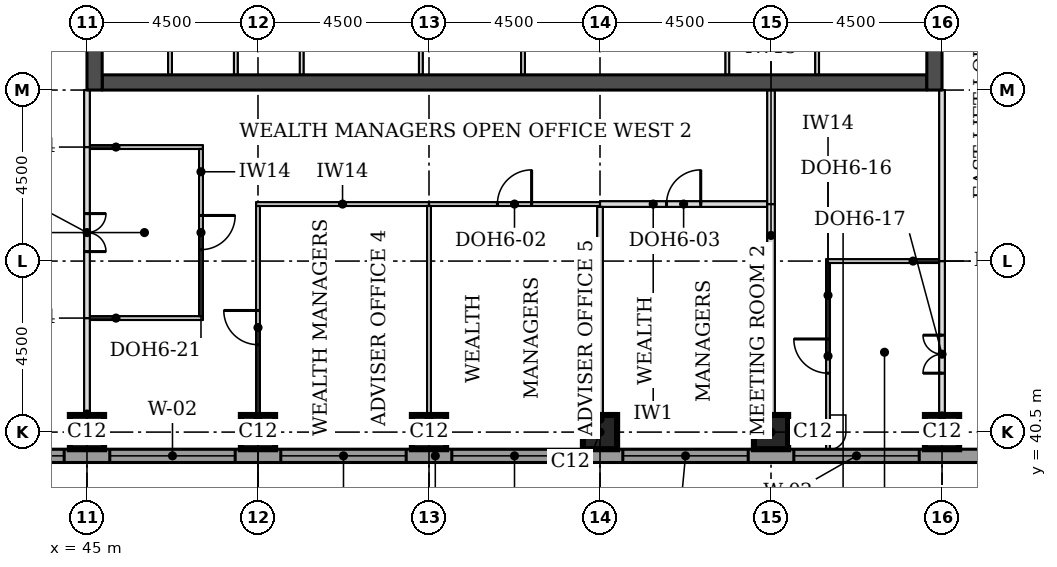
"""IFC4 building model, lengths in metres.
Left out: names, types, materials, properties, quantities, classifications, styles, units other than length and angle.
Written with IfcOpenShell. Run it as: python <this file> out.ifc"""

import sys

from ifc_helpers import new_model, si_unit, direction, frame, frame_2d, origin, origin_2d, place, context, subcontext, project, spatial, rectangle, extrude, element, fill, save


model = new_model("IFC4")
c1 = context("Model", 3, precision=1e-05, world=origin(), true_north=direction((0.0, 1.0)))
c2 = subcontext(c1, "Body", "Model", "MODEL_VIEW")
j1 = project(units=[si_unit("LENGTHUNIT", "METRE"), si_unit("PLANEANGLEUNIT", "RADIAN")], contexts=[c1])
p1 = place(None, origin())
s1 = spatial("IfcSite", under=j1, at=p1, CompositionType="ELEMENT")
p2 = place(p1, origin())
s2 = spatial("IfcBuilding", under=s1, at=p2, CompositionType="ELEMENT")
p3 = place(p2, frame((0.0, 0.0, 188.4)))
s3 = spatial("IfcBuildingStorey", under=s2, at=p3, CompositionType="ELEMENT", Elevation=188.4)
for number, where, z_axis, x_axis in (
    (1, (45.0, 40.5, 0.0), (0.0, 0.0, 1.0), (1.0, 0.0, 0.0)),
    (2, (49.5, 40.5, 0.0), (0.0, 0.0, 1.0), (1.0, 0.0, 0.0)),
    (3, (54.0, 40.5, 0.0), (0.0, 0.0, 1.0), (1.0, 0.0, 0.0)),
    (4, (58.5, 40.5, 0.0), (0.0, 0.0, 1.0), (1.0, 0.0, 0.0)),
    (5, (63.0, 40.5, 0.0), (0.0, 0.0, 1.0), (1.0, 0.0, 0.0)),
    (6, (67.5, 40.5, 0.0), (0.0, 0.0, 1.0), (1.0, 0.0, 0.0)),
):
    element("IfcColumn", number, at=place(p3, frame(where, z_axis=z_axis, x_axis=x_axis)), inside=s3, PredefinedType="COLUMN", context=c2, shape_type="SweptSolid", body=[
        extrude(rectangle(XDim=0.9, YDim=0.9, at=origin_2d()), origin(), (0.0, 0.0, 1.0), 3.7),
    ])
p4 = place(p3, frame((45.4, 49.7, 0.0), z_axis=(0.0, 0.0, 1.0), x_axis=(1.0, 0.0, 0.0)))
e7 = element("IfcWall", 7, at=p4, inside=s3, PredefinedType="SHEAR", context=c2, shape_type="SweptSolid", body=[
    extrude(rectangle(XDim=21.7, YDim=0.4, at=frame_2d((10.85, 0.0))), origin(), (0.0, 0.0, 1.0), 3.7),
])
p5 = place(p3, frame((45.2, 49.5, 0.0), z_axis=(0.0, 0.0, 1.0), x_axis=(0.0, 1.0, 0.0)))
e8 = element("IfcWall", 8, at=p5, inside=s3, PredefinedType="SHEAR", context=c2, shape_type="SweptSolid", body=[
    extrude(rectangle(XDim=22.5, YDim=0.4, at=frame_2d((11.25, 0.0))), origin(), (0.0, 0.0, 1.0), 3.7),
])
p6 = place(p5, frame((4.2, 0.0, 0.0)))
e9 = element("IfcOpeningElement", 9, at=p6, cuts=e8, PredefinedType="OPENING", context=c2, shape_type="SweptSolid", body=[
    extrude(rectangle(XDim=1.8, YDim=2.1, at=frame_2d((0.9, 1.05))), frame((0.0, 0.21, 0.0), z_axis=(0.0, -1.0, 0.0), x_axis=(1.0, 0.0, 0.0)), (0.0, 0.0, 1.0), 0.42),
])
p7 = place(p5, frame((6.9, 0.0, 0.0)))
e10 = element("IfcOpeningElement", 10, at=p7, cuts=e8, PredefinedType="OPENING", context=c2, shape_type="SweptSolid", body=[
    extrude(rectangle(XDim=1.1, YDim=2.1, at=frame_2d((0.55, 1.05))), frame((0.0, 0.21, 0.0), z_axis=(0.0, -1.0, 0.0), x_axis=(1.0, 0.0, 0.0)), (0.0, 0.0, 1.0), 0.42),
])
p8 = place(p5, frame((13.6, 0.0, 0.0)))
e11 = element("IfcOpeningElement", 11, at=p8, cuts=e8, PredefinedType="OPENING", context=c2, shape_type="SweptSolid", body=[
    extrude(rectangle(XDim=1.1, YDim=2.1, at=frame_2d((0.55, 1.05))), frame((0.0, 0.21, 0.0), z_axis=(0.0, -1.0, 0.0), x_axis=(1.0, 0.0, 0.0)), (0.0, 0.0, 1.0), 0.42),
])
p9 = place(p5, frame((16.5, 0.0, 0.0)))
e12 = element("IfcOpeningElement", 12, at=p9, cuts=e8, PredefinedType="OPENING", context=c2, shape_type="SweptSolid", body=[
    extrude(rectangle(XDim=1.8, YDim=2.1, at=frame_2d((0.9, 1.05))), frame((0.0, 0.21, 0.0), z_axis=(0.0, -1.0, 0.0), x_axis=(1.0, 0.0, 0.0)), (0.0, 0.0, 1.0), 0.42),
])
p10 = place(p3, frame((67.3, 49.5, 0.0), z_axis=(0.0, 0.0, 1.0), x_axis=(0.0, 1.0, 0.0)))
e13 = element("IfcWall", 13, at=p10, inside=s3, PredefinedType="SHEAR", context=c2, shape_type="SweptSolid", body=[
    extrude(rectangle(XDim=22.5, YDim=0.4, at=frame_2d((11.25, 0.0))), origin(), (0.0, 0.0, 1.0), 3.7),
])
p11 = place(p10, frame((4.2, 0.0, 0.0)))
e14 = element("IfcOpeningElement", 14, at=p11, cuts=e13, PredefinedType="OPENING", context=c2, shape_type="SweptSolid", body=[
    extrude(rectangle(XDim=1.8, YDim=2.1, at=frame_2d((0.9, 1.05))), frame((0.0, 0.21, 0.0), z_axis=(0.0, -1.0, 0.0), x_axis=(1.0, 0.0, 0.0)), (0.0, 0.0, 1.0), 0.42),
])
p12 = place(p10, frame((6.9, 0.0, 0.0)))
e15 = element("IfcOpeningElement", 15, at=p12, cuts=e13, PredefinedType="OPENING", context=c2, shape_type="SweptSolid", body=[
    extrude(rectangle(XDim=1.1, YDim=2.1, at=frame_2d((0.55, 1.05))), frame((0.0, 0.21, 0.0), z_axis=(0.0, -1.0, 0.0), x_axis=(1.0, 0.0, 0.0)), (0.0, 0.0, 1.0), 0.42),
])
p13 = place(p10, frame((13.6, 0.0, 0.0)))
e16 = element("IfcOpeningElement", 16, at=p13, cuts=e13, PredefinedType="OPENING", context=c2, shape_type="SweptSolid", body=[
    extrude(rectangle(XDim=1.1, YDim=2.1, at=frame_2d((0.55, 1.05))), frame((0.0, 0.21, 0.0), z_axis=(0.0, -1.0, 0.0), x_axis=(1.0, 0.0, 0.0)), (0.0, 0.0, 1.0), 0.42),
])
p14 = place(p10, frame((16.5, 0.0, 0.0)))
e17 = element("IfcOpeningElement", 17, at=p14, cuts=e13, PredefinedType="OPENING", context=c2, shape_type="SweptSolid", body=[
    extrude(rectangle(XDim=1.8, YDim=2.1, at=frame_2d((0.9, 1.05))), frame((0.0, 0.21, 0.0), z_axis=(0.0, -1.0, 0.0), x_axis=(1.0, 0.0, 0.0)), (0.0, 0.0, 1.0), 0.42),
])
p15 = place(p3, frame((36.0, 39.875, 0.0), z_axis=(0.0, 0.0, 1.0), x_axis=(1.0, 0.0, 0.0)))
e18 = element("IfcWall", 18, at=p15, inside=s3, PredefinedType="STANDARD", context=c2, shape_type="SweptSolid", body=[
    extrude(rectangle(XDim=36.331, YDim=0.35, at=frame_2d((18.166, 0.0))), origin(), (0.0, 0.0, 1.0), 3.525),
])
p16 = place(p15, frame((5.1, 0.0, 0.9)))
e19 = element("IfcOpeningElement", 19, at=p16, cuts=e18, PredefinedType="OPENING", context=c2, shape_type="SweptSolid", body=[
    extrude(rectangle(XDim=3.3, YDim=1.9, at=frame_2d((1.65, 0.95))), frame((0.0, 0.185, 0.0), z_axis=(0.0, -1.0, 0.0), x_axis=(1.0, 0.0, 0.0)), (0.0, 0.0, 1.0), 0.37),
])
p17 = place(p15, frame((9.6, 0.0, 0.9)))
e20 = element("IfcOpeningElement", 20, at=p17, cuts=e18, PredefinedType="OPENING", context=c2, shape_type="SweptSolid", body=[
    extrude(rectangle(XDim=3.3, YDim=1.9, at=frame_2d((1.65, 0.95))), frame((0.0, 0.185, 0.0), z_axis=(0.0, -1.0, 0.0), x_axis=(1.0, 0.0, 0.0)), (0.0, 0.0, 1.0), 0.37),
])
p18 = place(p15, frame((14.1, 0.0, 0.9)))
e21 = element("IfcOpeningElement", 21, at=p18, cuts=e18, PredefinedType="OPENING", context=c2, shape_type="SweptSolid", body=[
    extrude(rectangle(XDim=3.3, YDim=1.9, at=frame_2d((1.65, 0.95))), frame((0.0, 0.185, 0.0), z_axis=(0.0, -1.0, 0.0), x_axis=(1.0, 0.0, 0.0)), (0.0, 0.0, 1.0), 0.37),
])
p19 = place(p15, frame((18.6, 0.0, 0.9)))
e22 = element("IfcOpeningElement", 22, at=p19, cuts=e18, PredefinedType="OPENING", context=c2, shape_type="SweptSolid", body=[
    extrude(rectangle(XDim=3.3, YDim=1.9, at=frame_2d((1.65, 0.95))), frame((0.0, 0.185, 0.0), z_axis=(0.0, -1.0, 0.0), x_axis=(1.0, 0.0, 0.0)), (0.0, 0.0, 1.0), 0.37),
])
p20 = place(p15, frame((23.1, 0.0, 0.9)))
e23 = element("IfcOpeningElement", 23, at=p20, cuts=e18, PredefinedType="OPENING", context=c2, shape_type="SweptSolid", body=[
    extrude(rectangle(XDim=3.3, YDim=1.9, at=frame_2d((1.65, 0.95))), frame((0.0, 0.185, 0.0), z_axis=(0.0, -1.0, 0.0), x_axis=(1.0, 0.0, 0.0)), (0.0, 0.0, 1.0), 0.37),
])
p21 = place(p15, frame((27.6, 0.0, 0.9)))
e24 = element("IfcOpeningElement", 24, at=p21, cuts=e18, PredefinedType="OPENING", context=c2, shape_type="SweptSolid", body=[
    extrude(rectangle(XDim=3.3, YDim=1.9, at=frame_2d((1.65, 0.95))), frame((0.0, 0.185, 0.0), z_axis=(0.0, -1.0, 0.0), x_axis=(1.0, 0.0, 0.0)), (0.0, 0.0, 1.0), 0.37),
])
for number, where, z_axis, x_axis in (
    (25, (45.075, 43.5, 0.0), (0.0, 0.0, 1.0), (1.0, 0.0, 0.0)),
    (26, (64.45, 45.0, 0.0), (0.0, 0.0, 1.0), (1.0, 0.0, 0.0)),
):
    element("IfcWall", number, at=place(p3, frame(where, z_axis=z_axis, x_axis=x_axis)), inside=s3, PredefinedType="PARTITIONING", context=c2, shape_type="SweptSolid", body=[
        extrude(rectangle(XDim=2.975, YDim=0.1, at=frame_2d((1.488, 0.0))), origin(), (0.0, 0.0, 1.0), 3.55),
    ])
p22 = place(p3, frame((49.45, 46.5, 0.0), z_axis=(0.0, 0.0, 1.0), x_axis=(1.0, 0.0, 0.0)))
e27 = element("IfcWall", 27, at=p22, inside=s3, PredefinedType="PARTITIONING", context=c2, shape_type="SweptSolid", body=[
    extrude(rectangle(XDim=4.55, YDim=0.1, at=frame_2d((2.275, 0.0))), origin(), (0.0, 0.0, 1.0), 3.55),
])
p23 = place(p3, frame((54.0, 46.5, 0.0), z_axis=(0.0, 0.0, 1.0), x_axis=(1.0, 0.0, 0.0)))
e28 = element("IfcWall", 28, at=p23, inside=s3, PredefinedType="PARTITIONING", context=c2, shape_type="SweptSolid", body=[
    extrude(rectangle(XDim=4.5, YDim=0.1, at=frame_2d((2.25, 0.0))), origin(), (0.0, 0.0, 1.0), 3.55),
])
p24 = place(p23, frame((1.8, 0.0, 0.0)))
e29 = element("IfcOpeningElement", 29, at=p24, cuts=e28, PredefinedType="OPENING", context=c2, shape_type="SweptSolid", body=[
    extrude(rectangle(XDim=0.9, YDim=2.1, at=frame_2d((0.45, 1.05))), frame((0.0, 0.06, 0.0), z_axis=(0.0, -1.0, 0.0), x_axis=(1.0, 0.0, 0.0)), (0.0, 0.0, 1.0), 0.12),
])
p25 = place(p3, frame((58.5, 46.5, 0.0), z_axis=(0.0, 0.0, 1.0), x_axis=(1.0, 0.0, 0.0)))
e30 = element("IfcWall", 30, at=p25, inside=s3, PredefinedType="PARTITIONING", context=c2, shape_type="SweptSolid", body=[
    extrude(rectangle(XDim=4.4, YDim=0.15, at=frame_2d((2.2, 0.0))), origin(), (0.0, 0.0, 1.0), 3.55),
])
p26 = place(p25, frame((1.75, 0.0, 0.0)))
e31 = element("IfcOpeningElement", 31, at=p26, cuts=e30, PredefinedType="OPENING", context=c2, shape_type="SweptSolid", body=[
    extrude(rectangle(XDim=0.9, YDim=2.1, at=frame_2d((0.45, 1.05))), frame((0.0, 0.085, 0.0), z_axis=(0.0, -1.0, 0.0), x_axis=(1.0, 0.0, 0.0)), (0.0, 0.0, 1.0), 0.17),
])
p27 = place(p3, frame((45.075, 48.0, 0.0), z_axis=(0.0, 0.0, 1.0), x_axis=(1.0, 0.0, 0.0)))
e32 = element("IfcWall", 32, at=p27, inside=s3, PredefinedType="PARTITIONING", context=c2, shape_type="SweptSolid", body=[
    extrude(rectangle(XDim=2.975, YDim=0.1, at=frame_2d((1.488, 0.0))), origin(), (0.0, 0.0, 1.0), 3.55),
])
p28 = place(p3, frame((45.0, 40.05, 0.0), z_axis=(0.0, 0.0, 1.0), x_axis=(0.0, 1.0, 0.0)))
e33 = element("IfcWall", 33, at=p28, inside=s3, PredefinedType="PARTITIONING", context=c2, shape_type="SweptSolid", body=[
    extrude(rectangle(XDim=3.45, YDim=0.15, at=frame_2d((1.725, 0.0))), origin(), (0.0, 0.0, 1.0), 3.022),
])
p29 = place(p3, frame((49.5, 40.05, 0.0), z_axis=(0.0, 0.0, 1.0), x_axis=(0.0, 1.0, 0.0)))
e34 = element("IfcWall", 34, at=p29, inside=s3, PredefinedType="PARTITIONING", context=c2, shape_type="SweptSolid", body=[
    extrude(rectangle(XDim=6.4, YDim=0.1, at=frame_2d((3.2, 0.0))), origin(), (0.0, 0.0, 1.0), 3.55),
])
p30 = place(p29, frame((2.75, 0.0, 0.0)))
e35 = element("IfcOpeningElement", 35, at=p30, cuts=e34, PredefinedType="OPENING", context=c2, shape_type="SweptSolid", body=[
    extrude(rectangle(XDim=0.9, YDim=2.1, at=frame_2d((0.45, 1.05))), frame((0.0, 0.06, 0.0), z_axis=(0.0, -1.0, 0.0), x_axis=(1.0, 0.0, 0.0)), (0.0, 0.0, 1.0), 0.12),
])
p31 = place(p3, frame((54.0, 40.05, 0.0), z_axis=(0.0, 0.0, 1.0), x_axis=(0.0, 1.0, 0.0)))
e36 = element("IfcWall", 36, at=p31, inside=s3, PredefinedType="PARTITIONING", context=c2, shape_type="SweptSolid", body=[
    extrude(rectangle(XDim=6.4, YDim=0.1, at=frame_2d((3.2, 0.0))), origin(), (0.0, 0.0, 1.0), 3.55),
])
p32 = place(p3, frame((58.5, 40.05, 0.0), z_axis=(0.0, 0.0, 1.0), x_axis=(0.0, 1.0, 0.0)))
e37 = element("IfcWall", 37, at=p32, inside=s3, PredefinedType="PARTITIONING", context=c2, shape_type="SweptSolid", body=[
    extrude(rectangle(XDim=6.375, YDim=0.15, at=frame_2d((3.188, 0.0))), origin(), (0.0, 0.0, 1.0), 3.55),
])
p33 = place(p3, frame((63.0, 40.05, 0.0), z_axis=(0.0, 0.0, 1.0), x_axis=(0.0, 1.0, 0.0)))
e38 = element("IfcWall", 38, at=p33, inside=s3, PredefinedType="PARTITIONING", context=c2, shape_type="SweptSolid", body=[
    extrude(rectangle(XDim=6.45, YDim=0.2, at=frame_2d((3.225, 0.0))), origin(), (0.0, 0.0, 1.0), 3.55),
])
p34 = place(p3, frame((64.5, 40.05, 0.0), z_axis=(0.0, 0.0, 1.0), x_axis=(0.0, 1.0, 0.0)))
e39 = element("IfcWall", 39, at=p34, inside=s3, PredefinedType="PARTITIONING", context=c2, shape_type="SweptSolid", body=[
    extrude(rectangle(XDim=4.9, YDim=0.1, at=frame_2d((2.45, 0.0))), origin(), (0.0, 0.0, 1.0), 3.55),
])
p35 = place(p34, frame((2.0, 0.0, 0.0)))
e40 = element("IfcOpeningElement", 40, at=p35, cuts=e39, PredefinedType="OPENING", context=c2, shape_type="SweptSolid", body=[
    extrude(rectangle(XDim=0.9, YDim=2.1, at=frame_2d((0.45, 1.05))), frame((0.0, 0.06, 0.0), z_axis=(0.0, -1.0, 0.0), x_axis=(1.0, 0.0, 0.0)), (0.0, 0.0, 1.0), 0.12),
])
p36 = place(p3, frame((67.5, 40.05, 0.0), z_axis=(0.0, 0.0, 1.0), x_axis=(0.0, 1.0, 0.0)))
e41 = element("IfcWall", 41, at=p36, inside=s3, PredefinedType="PARTITIONING", context=c2, shape_type="SweptSolid", body=[
    extrude(rectangle(XDim=4.95, YDim=0.15, at=frame_2d((2.475, 0.0))), origin(), (0.0, 0.0, 1.0), 3.022),
])
p37 = place(p36, frame((2.0, 0.0, 0.0)))
e42 = element("IfcOpeningElement", 42, at=p37, cuts=e41, PredefinedType="OPENING", context=c2, shape_type="SweptSolid", body=[
    extrude(rectangle(XDim=1.0, YDim=2.1, at=frame_2d((0.5, 1.05))), frame((0.0, 0.085, 0.0), z_axis=(0.0, -1.0, 0.0), x_axis=(1.0, 0.0, 0.0)), (0.0, 0.0, 1.0), 0.17),
])
p38 = place(p3, frame((45.0, 43.5, 0.0), z_axis=(0.0, 0.0, 1.0), x_axis=(0.0, 1.0, 0.0)))
e43 = element("IfcWall", 43, at=p38, inside=s3, PredefinedType="PARTITIONING", context=c2, shape_type="SweptSolid", body=[
    extrude(rectangle(XDim=4.5, YDim=0.15, at=frame_2d((2.25, 0.0))), origin(), (0.0, 0.0, 1.0), 3.022),
])
p39 = place(p38, frame((1.75, 0.0, 0.0)))
e44 = element("IfcOpeningElement", 44, at=p39, cuts=e43, PredefinedType="OPENING", context=c2, shape_type="SweptSolid", body=[
    extrude(rectangle(XDim=1.0, YDim=2.1, at=frame_2d((0.5, 1.05))), frame((0.0, 0.085, 0.0), z_axis=(0.0, -1.0, 0.0), x_axis=(1.0, 0.0, 0.0)), (0.0, 0.0, 1.0), 0.17),
])
p40 = place(p3, frame((48.0, 43.55, 0.0), z_axis=(0.0, 0.0, 1.0), x_axis=(0.0, 1.0, 0.0)))
e45 = element("IfcWall", 45, at=p40, inside=s3, PredefinedType="PARTITIONING", context=c2, shape_type="SweptSolid", body=[
    extrude(rectangle(XDim=4.4, YDim=0.1, at=frame_2d((2.2, 0.0))), origin(), (0.0, 0.0, 1.0), 3.55),
])
p41 = place(p40, frame((1.75, 0.0, 0.0)))
e46 = element("IfcOpeningElement", 46, at=p41, cuts=e45, PredefinedType="OPENING", context=c2, shape_type="SweptSolid", body=[
    extrude(rectangle(XDim=0.9, YDim=2.1, at=frame_2d((0.45, 1.05))), frame((0.0, 0.06, 0.0), z_axis=(0.0, -1.0, 0.0), x_axis=(1.0, 0.0, 0.0)), (0.0, 0.0, 1.0), 0.12),
])
p42 = place(p3, frame((67.5, 45.0, 0.0), z_axis=(0.0, 0.0, 1.0), x_axis=(0.0, 1.0, 0.0)))
e47 = element("IfcWall", 47, at=p42, inside=s3, PredefinedType="PARTITIONING", context=c2, shape_type="SweptSolid", body=[
    extrude(rectangle(XDim=4.5, YDim=0.15, at=frame_2d((2.25, 0.0))), origin(), (0.0, 0.0, 1.0), 3.022),
])
p43 = place(p3, frame((63.0, 46.5, 0.0), z_axis=(0.0, 0.0, 1.0), x_axis=(0.0, 1.0, 0.0)))
e48 = element("IfcWall", 48, at=p43, inside=s3, PredefinedType="PARTITIONING", context=c2, shape_type="SweptSolid", body=[
    extrude(rectangle(XDim=3.0, YDim=0.2, at=frame_2d((1.5, 0.0))), origin(), (0.0, 0.0, 1.0), 3.55),
])
p44 = place(p3, frame((45.0, 48.0, 0.0), z_axis=(0.0, 0.0, 1.0), x_axis=(0.0, 1.0, 0.0)))
e49 = element("IfcWall", 49, at=p44, inside=s3, PredefinedType="PARTITIONING", context=c2, shape_type="SweptSolid", body=[
    extrude(rectangle(XDim=1.5, YDim=0.15, at=frame_2d((0.75, 0.0))), origin(), (0.0, 0.0, 1.0), 3.022),
])
for number, where, z_axis, x_axis in (
    (50, (47.185, 49.9, 0.0), (0.0, 0.0, 1.0), (0.0, 1.0, 0.0)),
    (51, (48.917, 49.9, 0.0), (0.0, 0.0, 1.0), (0.0, 1.0, 0.0)),
    (52, (50.65, 49.9, 0.0), (0.0, 0.0, 1.0), (0.0, 1.0, 0.0)),
    (53, (53.786, 49.9, 0.0), (0.0, 0.0, 1.0), (0.0, 1.0, 0.0)),
    (54, (56.474, 49.9, 0.0), (0.0, 0.0, 1.0), (0.0, 1.0, 0.0)),
    (55, (61.85, 49.9, 0.0), (0.0, 0.0, 1.0), (0.0, 1.0, 0.0)),
    (56, (64.212, 49.9, 0.0), (0.0, 0.0, 1.0), (0.0, 1.0, 0.0)),
):
    element("IfcWall", number, at=place(p3, frame(where, z_axis=z_axis, x_axis=x_axis)), inside=s3, PredefinedType="PARTITIONING", context=c2, shape_type="SweptSolid", body=[
        extrude(rectangle(XDim=3.1, YDim=0.1, at=frame_2d((1.55, 0.0))), origin(), (0.0, 0.0, 1.0), 3.55),
    ])
p45 = place(p16, origin())
e57 = element("IfcWindow", 57, at=p45, inside=s3, PartitioningType="SINGLE_PANEL", PredefinedType="WINDOW", context=c2, shape_type="SweptSolid", body=[
    extrude(rectangle(XDim=3.3, YDim=1.9, at=frame_2d((1.65, 0.95))), frame((0.0, 0.085, 0.0), z_axis=(0.0, -1.0, 0.0), x_axis=(1.0, 0.0, 0.0)), (0.0, 0.0, 1.0), 0.06),
])
fill(e19, e57)
p46 = place(p17, origin())
e58 = element("IfcWindow", 58, at=p46, inside=s3, PartitioningType="SINGLE_PANEL", PredefinedType="WINDOW", context=c2, shape_type="SweptSolid", body=[
    extrude(rectangle(XDim=3.3, YDim=1.9, at=frame_2d((1.65, 0.95))), frame((0.0, 0.085, 0.0), z_axis=(0.0, -1.0, 0.0), x_axis=(1.0, 0.0, 0.0)), (0.0, 0.0, 1.0), 0.06),
])
fill(e20, e58)
p47 = place(p18, origin())
e59 = element("IfcWindow", 59, at=p47, inside=s3, PartitioningType="SINGLE_PANEL", PredefinedType="WINDOW", context=c2, shape_type="SweptSolid", body=[
    extrude(rectangle(XDim=3.3, YDim=1.9, at=frame_2d((1.65, 0.95))), frame((0.0, 0.085, 0.0), z_axis=(0.0, -1.0, 0.0), x_axis=(1.0, 0.0, 0.0)), (0.0, 0.0, 1.0), 0.06),
])
fill(e21, e59)
p48 = place(p19, origin())
e60 = element("IfcWindow", 60, at=p48, inside=s3, PartitioningType="SINGLE_PANEL", PredefinedType="WINDOW", context=c2, shape_type="SweptSolid", body=[
    extrude(rectangle(XDim=3.3, YDim=1.9, at=frame_2d((1.65, 0.95))), frame((0.0, 0.085, 0.0), z_axis=(0.0, -1.0, 0.0), x_axis=(1.0, 0.0, 0.0)), (0.0, 0.0, 1.0), 0.06),
])
fill(e22, e60)
p49 = place(p20, origin())
e61 = element("IfcWindow", 61, at=p49, inside=s3, PartitioningType="SINGLE_PANEL", PredefinedType="WINDOW", context=c2, shape_type="SweptSolid", body=[
    extrude(rectangle(XDim=3.3, YDim=1.9, at=frame_2d((1.65, 0.95))), frame((0.0, 0.085, 0.0), z_axis=(0.0, -1.0, 0.0), x_axis=(1.0, 0.0, 0.0)), (0.0, 0.0, 1.0), 0.06),
])
fill(e23, e61)
p50 = place(p21, origin())
e62 = element("IfcWindow", 62, at=p50, inside=s3, PartitioningType="SINGLE_PANEL", PredefinedType="WINDOW", context=c2, shape_type="SweptSolid", body=[
    extrude(rectangle(XDim=3.3, YDim=1.9, at=frame_2d((1.65, 0.95))), frame((0.0, 0.085, 0.0), z_axis=(0.0, -1.0, 0.0), x_axis=(1.0, 0.0, 0.0)), (0.0, 0.0, 1.0), 0.06),
])
fill(e24, e62)
p51 = place(p39, frame((1.0, 0.0, 0.0), z_axis=(0.0, 0.0, 1.0), x_axis=(-1.0, 0.0, 0.0)))
e63 = element("IfcDoor", 63, at=p51, inside=s3, OperationType="DOUBLE_DOOR_SINGLE_SWING", PredefinedType="DOOR", context=c2, shape_type="SweptSolid", body=[
    extrude(rectangle(XDim=1.0, YDim=2.1, at=frame_2d((0.5, 1.05))), frame((0.0, 0.025, 0.0), z_axis=(0.0, -1.0, 0.0), x_axis=(1.0, 0.0, 0.0)), (0.0, 0.0, 1.0), 0.05),
])
fill(e44, e63)
p52 = place(p41, frame((0.9, 0.0, 0.0), z_axis=(0.0, 0.0, 1.0), x_axis=(-1.0, 0.0, 0.0)))
e64 = element("IfcDoor", 64, at=p52, inside=s3, OperationType="SINGLE_SWING_LEFT", PredefinedType="DOOR", context=c2, shape_type="SweptSolid", body=[
    extrude(rectangle(XDim=0.9, YDim=2.1, at=frame_2d((0.45, 1.05))), frame((0.0, 0.025, 0.0), z_axis=(0.0, -1.0, 0.0), x_axis=(1.0, 0.0, 0.0)), (0.0, 0.0, 1.0), 0.05),
])
fill(e46, e64)
p53 = place(p30, origin())
e65 = element("IfcDoor", 65, at=p53, inside=s3, OperationType="SINGLE_SWING_RIGHT", PredefinedType="DOOR", context=c2, shape_type="SweptSolid", body=[
    extrude(rectangle(XDim=0.9, YDim=2.1, at=frame_2d((0.45, 1.05))), frame((0.0, 0.025, 0.0), z_axis=(0.0, -1.0, 0.0), x_axis=(1.0, 0.0, 0.0)), (0.0, 0.0, 1.0), 0.05),
])
fill(e35, e65)
p54 = place(p24, origin())
e66 = element("IfcDoor", 66, at=p54, inside=s3, OperationType="SINGLE_SWING_RIGHT", PredefinedType="DOOR", context=c2, shape_type="SweptSolid", body=[
    extrude(rectangle(XDim=0.9, YDim=2.1, at=frame_2d((0.45, 1.05))), frame((0.0, 0.025, 0.0), z_axis=(0.0, -1.0, 0.0), x_axis=(1.0, 0.0, 0.0)), (0.0, 0.0, 1.0), 0.05),
])
fill(e29, e66)
p55 = place(p26, origin())
e67 = element("IfcDoor", 67, at=p55, inside=s3, OperationType="SINGLE_SWING_RIGHT", PredefinedType="DOOR", context=c2, shape_type="SweptSolid", body=[
    extrude(rectangle(XDim=0.9, YDim=2.1, at=frame_2d((0.45, 1.05))), frame((0.0, 0.025, 0.0), z_axis=(0.0, -1.0, 0.0), x_axis=(1.0, 0.0, 0.0)), (0.0, 0.0, 1.0), 0.05),
])
fill(e31, e67)
p56 = place(p37, origin())
e68 = element("IfcDoor", 68, at=p56, inside=s3, OperationType="DOUBLE_DOOR_SINGLE_SWING", PredefinedType="DOOR", context=c2, shape_type="SweptSolid", body=[
    extrude(rectangle(XDim=1.0, YDim=2.1, at=frame_2d((0.5, 1.05))), frame((0.0, 0.025, 0.0), z_axis=(0.0, -1.0, 0.0), x_axis=(1.0, 0.0, 0.0)), (0.0, 0.0, 1.0), 0.05),
])
fill(e42, e68)
p57 = place(p35, origin())
e69 = element("IfcDoor", 69, at=p57, inside=s3, OperationType="SINGLE_SWING_RIGHT", PredefinedType="DOOR", context=c2, shape_type="SweptSolid", body=[
    extrude(rectangle(XDim=0.9, YDim=2.1, at=frame_2d((0.45, 1.05))), frame((0.0, 0.025, 0.0), z_axis=(0.0, -1.0, 0.0), x_axis=(1.0, 0.0, 0.0)), (0.0, 0.0, 1.0), 0.05),
])
fill(e40, e69)
save(model, sys.argv[1])
